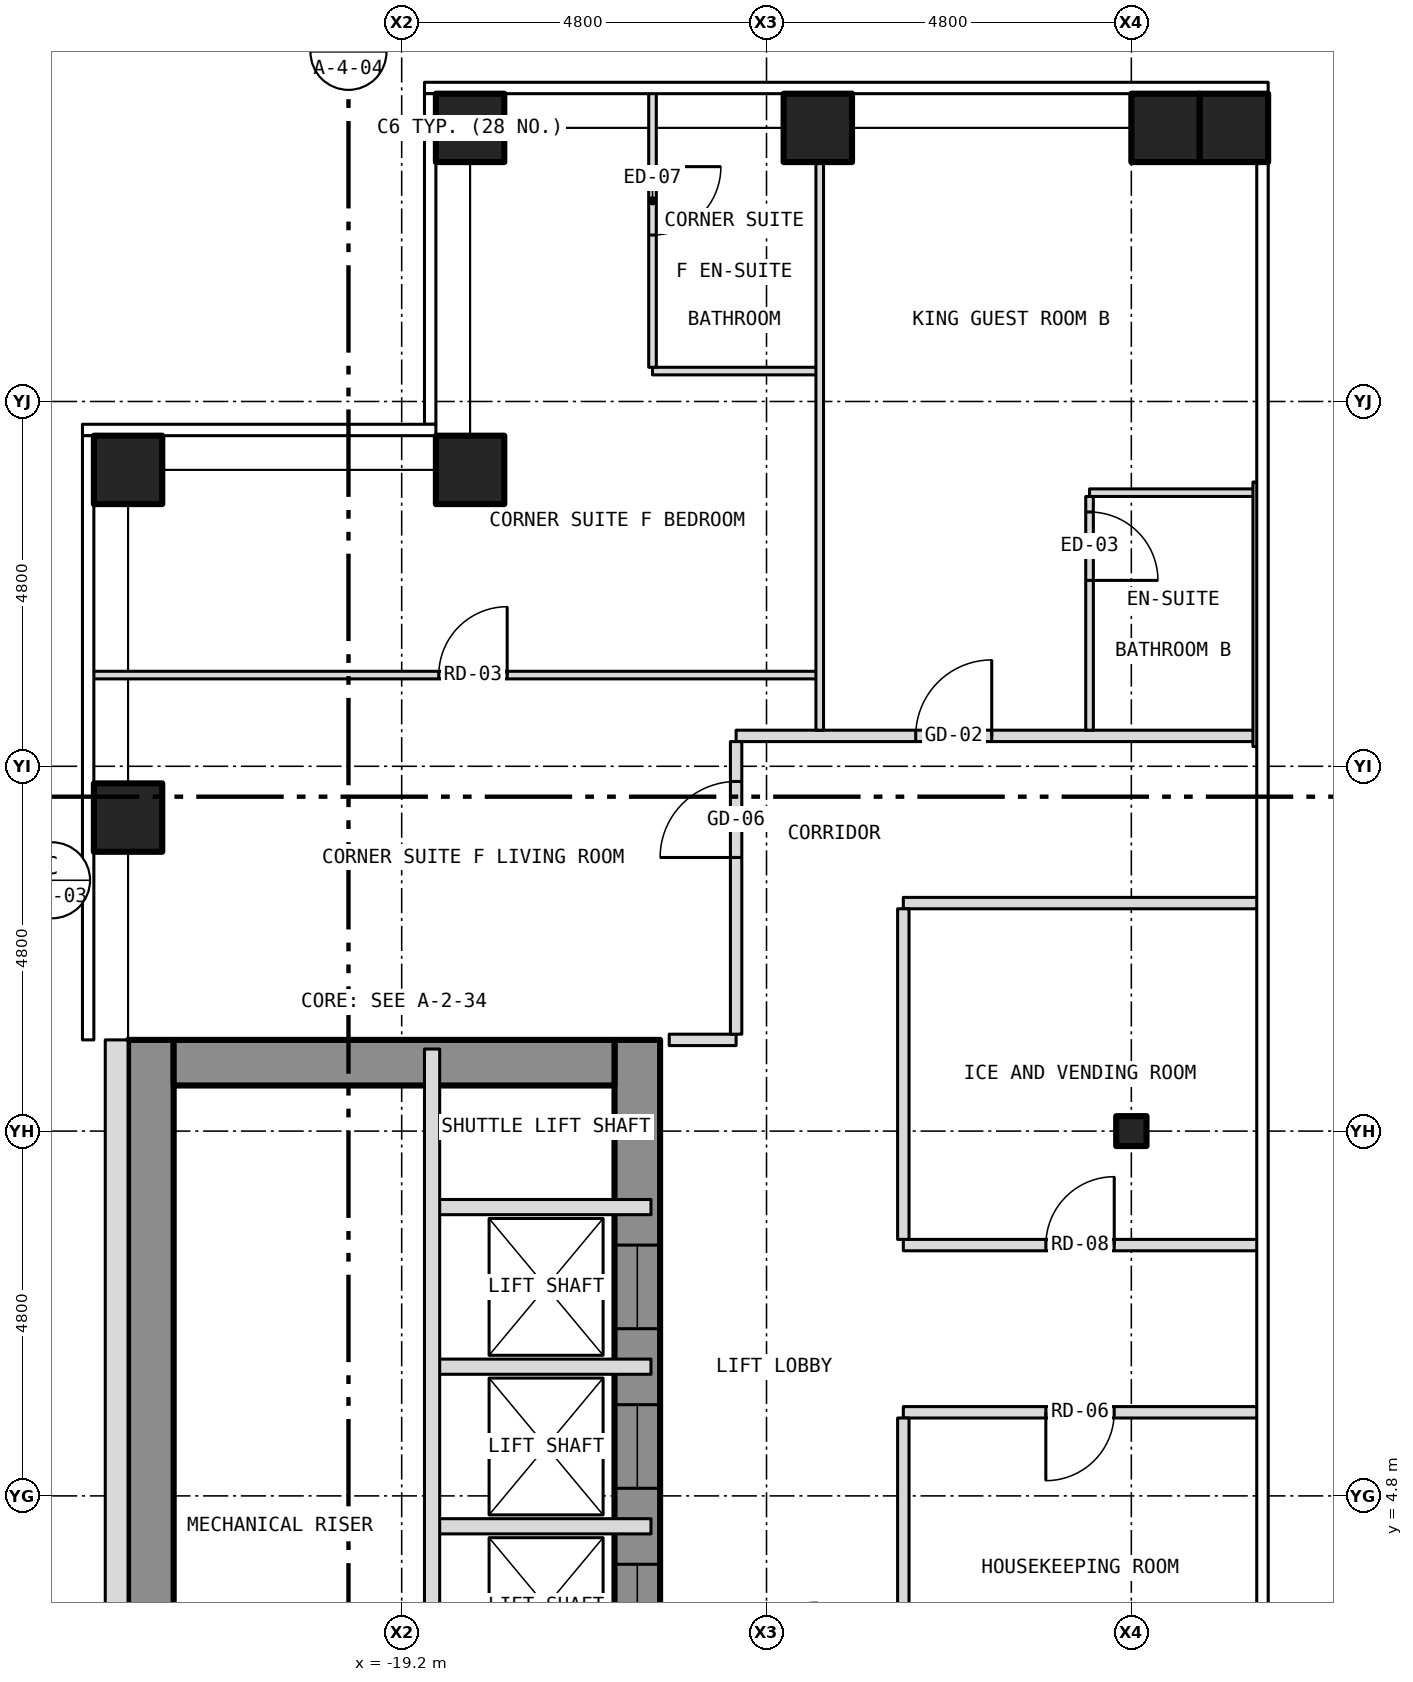
"""IFC4 building model, lengths in metres.
Left out: names, types, materials, properties, quantities, classifications, styles, units other than length and angle.
Written with IfcOpenShell. Run it as: python <this file> out.ifc"""

import sys

from ifc_helpers import new_model, si_unit, direction, frame, frame_2d, origin, origin_2d, place, context, subcontext, project, spatial, rectangle, hollow_rectangle, i_section, extrude, element, fill, save


model = new_model("IFC4")
c1 = context("Model", 3, precision=1e-05, world=origin(), true_north=direction((0.0, 1.0)))
c2 = subcontext(c1, "Body", "Model", "MODEL_VIEW")
j1 = project(units=[si_unit("LENGTHUNIT", "METRE"), si_unit("PLANEANGLEUNIT", "RADIAN")], contexts=[c1])
p1 = place(None, origin())
s1 = spatial("IfcSite", under=j1, at=p1, CompositionType="ELEMENT")
p2 = place(p1, origin())
s2 = spatial("IfcBuilding", under=s1, at=p2, CompositionType="ELEMENT")
p3 = place(p2, frame((0.0, 0.0, 124.0)))
s3 = spatial("IfcBuildingStorey", under=s2, at=p3, CompositionType="ELEMENT", Elevation=124.0)
for number, where, z_axis, x_axis in (
    (1, (-18.3, 22.8, -0.15), (0.0, 0.0, 1.0), (1.0, 0.0, 0.0)),
    (2, (-13.725, 22.8, -0.15), (0.0, 0.0, 1.0), (1.0, 0.0, 0.0)),
    (3, (-9.15, 22.8, -0.15), (0.0, 0.0, 1.0), (1.0, 0.0, 0.0)),
    (4, (-22.8, 13.725, -0.15), (0.0, 0.0, 1.0), (1.0, 0.0, 0.0)),
    (5, (-22.8, 18.3, -0.15), (0.0, 0.0, 1.0), (1.0, 0.0, 0.0)),
    (6, (-18.3, 18.3, -0.15), (0.0, 0.0, 1.0), (1.0, 0.0, 0.0)),
    (7, (-8.25, 22.8, -0.15), (0.0, 0.0, 1.0), (1.0, 0.0, 0.0)),
):
    element("IfcColumn", number, at=place(p3, frame(where, z_axis=z_axis, x_axis=x_axis)), inside=s3, PredefinedType="COLUMN", context=c2, shape_type="SweptSolid", body=[
        extrude(hollow_rectangle(XDim=0.9, YDim=0.9, WallThickness=0.05, at=origin_2d()), origin(), (0.0, 0.0, 1.0), 3.5),
    ])
p4 = place(p3, frame((-9.6, 9.6, -0.15), z_axis=(0.0, 0.0, 1.0), x_axis=(1.0, 0.0, 0.0)))
e8 = element("IfcColumn", 8, at=p4, inside=s3, PredefinedType="COLUMN", context=c2, shape_type="SweptSolid", body=[
    extrude(i_section(OverallWidth=0.399, OverallDepth=0.394, WebThickness=0.023, FlangeThickness=0.037, at=origin_2d()), origin(), (0.0, 0.0, 1.0), 3.5),
])
p5 = place(p3, frame((-16.1, -10.8, 0.0), z_axis=(0.0, 0.0, 1.0), x_axis=(0.0, 1.0, 0.0)))
e9 = element("IfcWall", 9, at=p5, inside=s3, PredefinedType="SHEAR", context=c2, shape_type="SweptSolid", body=[
    extrude(rectangle(XDim=21.6, YDim=0.6, at=frame_2d((10.8, 0.0))), origin(), (0.0, 0.0, 1.0), 3.25),
])
p6 = place(p5, frame((9.4, 0.0, 0.0)))
e10 = element("IfcOpeningElement", 10, at=p6, cuts=e9, PredefinedType="OPENING", context=c2, shape_type="SweptSolid", body=[
    extrude(rectangle(XDim=1.1, YDim=2.1, at=frame_2d((0.55, 1.05))), frame((0.0, 0.312, 0.0), z_axis=(0.0, -1.0, 0.0), x_axis=(1.0, 0.0, 0.0)), (0.0, 0.0, 1.0), 0.624),
])
p7 = place(p5, frame((11.5, 0.0, 0.0)))
e11 = element("IfcOpeningElement", 11, at=p7, cuts=e9, PredefinedType="OPENING", context=c2, shape_type="SweptSolid", body=[
    extrude(rectangle(XDim=1.1, YDim=2.1, at=frame_2d((0.55, 1.05))), frame((0.0, 0.312, 0.0), z_axis=(0.0, -1.0, 0.0), x_axis=(1.0, 0.0, 0.0)), (0.0, 0.0, 1.0), 0.624),
])
p8 = place(p5, frame((13.6, 0.0, 0.0)))
e12 = element("IfcOpeningElement", 12, at=p8, cuts=e9, PredefinedType="OPENING", context=c2, shape_type="SweptSolid", body=[
    extrude(rectangle(XDim=1.1, YDim=2.1, at=frame_2d((0.55, 1.05))), frame((0.0, 0.312, 0.0), z_axis=(0.0, -1.0, 0.0), x_axis=(1.0, 0.0, 0.0)), (0.0, 0.0, 1.0), 0.624),
])
p9 = place(p5, frame((15.7, 0.0, 0.0)))
e13 = element("IfcOpeningElement", 13, at=p9, cuts=e9, PredefinedType="OPENING", context=c2, shape_type="SweptSolid", body=[
    extrude(rectangle(XDim=1.1, YDim=2.1, at=frame_2d((0.55, 1.05))), frame((0.0, 0.312, 0.0), z_axis=(0.0, -1.0, 0.0), x_axis=(1.0, 0.0, 0.0)), (0.0, 0.0, 1.0), 0.624),
])
p10 = place(p5, frame((17.8, 0.0, 0.0)))
e14 = element("IfcOpeningElement", 14, at=p10, cuts=e9, PredefinedType="OPENING", context=c2, shape_type="SweptSolid", body=[
    extrude(rectangle(XDim=1.1, YDim=2.1, at=frame_2d((0.55, 1.05))), frame((0.0, 0.312, 0.0), z_axis=(0.0, -1.0, 0.0), x_axis=(1.0, 0.0, 0.0)), (0.0, 0.0, 1.0), 0.624),
])
p11 = place(p5, frame((0.758, 0.0, 0.0)))
e15 = element("IfcOpeningElement", 15, at=p11, cuts=e9, PredefinedType="OPENING", context=c2, shape_type="SweptSolid", body=[
    extrude(rectangle(XDim=1.1, YDim=2.1, at=frame_2d((0.55, 1.05))), frame((0.0, 0.312, 0.0), z_axis=(0.0, -1.0, 0.0), x_axis=(1.0, 0.0, 0.0)), (0.0, 0.0, 1.0), 0.624),
])
p12 = place(p5, frame((7.5, 0.0, 0.0)))
e16 = element("IfcOpeningElement", 16, at=p12, cuts=e9, PredefinedType="OPENING", context=c2, shape_type="SweptSolid", body=[
    extrude(rectangle(XDim=1.1, YDim=2.1, at=frame_2d((0.55, 1.05))), frame((0.0, 0.312, 0.0), z_axis=(0.0, -1.0, 0.0), x_axis=(1.0, 0.0, 0.0)), (0.0, 0.0, 1.0), 0.624),
])
p13 = place(p3, frame((-22.5, -10.8, 0.0), z_axis=(0.0, 0.0, 1.0), x_axis=(0.0, 1.0, 0.0)))
e17 = element("IfcWall", 17, at=p13, inside=s3, PredefinedType="SHEAR", context=c2, shape_type="SweptSolid", body=[
    extrude(rectangle(XDim=21.6, YDim=0.6, at=frame_2d((10.8, 0.0))), origin(), (0.0, 0.0, 1.0), 3.25),
])
p14 = place(p3, frame((-22.2, 10.5, 0.0), z_axis=(0.0, 0.0, 1.0), x_axis=(1.0, 0.0, 0.0)))
e18 = element("IfcWall", 18, at=p14, inside=s3, PredefinedType="SHEAR", context=c2, shape_type="SweptSolid", body=[
    extrude(rectangle(XDim=5.8, YDim=0.6, at=frame_2d((2.9, 0.0))), origin(), (0.0, 0.0, 1.0), 3.25),
])
p15 = place(p3, frame((-22.95, 10.8, 0.0), z_axis=(0.0, 0.0, 1.0), x_axis=(0.0, -1.0, 0.0)))
e19 = element("IfcWall", 19, at=p15, inside=s3, PredefinedType="SOLIDWALL", context=c2, shape_type="SweptSolid", body=[
    extrude(rectangle(XDim=21.6, YDim=0.3, at=frame_2d((10.8, 0.0))), origin(), (0.0, 0.0, 1.0), 3.5),
])
p16 = place(p15, frame((18.05, 0.0, 1.0)))
e20 = element("IfcOpeningElement", 20, at=p16, cuts=e19, PredefinedType="OPENING", context=c2, shape_type="SweptSolid", body=[
    extrude(rectangle(XDim=0.6, YDim=1.5, at=frame_2d((0.3, 0.75))), frame((0.0, 0.162, 0.0), z_axis=(0.0, -1.0, 0.0), x_axis=(1.0, 0.0, 0.0)), (0.0, 0.0, 1.0), 0.324),
])
p17 = place(p3, frame((-18.8, 4.4, 0.0), z_axis=(0.0, 0.0, 1.0), x_axis=(1.0, 0.0, 0.0)))
e21 = element("IfcWall", 21, at=p17, inside=s3, PredefinedType="PARTITIONING", context=c2, shape_type="SweptSolid", body=[
    extrude(rectangle(XDim=2.88, YDim=0.2, at=frame_2d((1.44, 0.0))), origin(), (0.0, 0.0, 1.0), 3.25),
])
p18 = place(p3, frame((-12.6, 5.9, 0.0), z_axis=(0.0, 0.0, 1.0), x_axis=(1.0, 0.0, 0.0)))
e22 = element("IfcWall", 22, at=p18, inside=s3, PredefinedType="PARTITIONING", context=c2, shape_type="SweptSolid", body=[
    extrude(rectangle(XDim=4.68, YDim=0.15, at=frame_2d((2.34, 0.0))), origin(), (0.0, 0.0, 1.0), 3.35),
])
p19 = place(p18, frame((1.875, 0.0, 0.0)))
e23 = element("IfcOpeningElement", 23, at=p19, cuts=e22, PredefinedType="OPENING", context=c2, shape_type="SweptSolid", body=[
    extrude(rectangle(XDim=0.9, YDim=2.1, at=frame_2d((0.45, 1.05))), frame((0.0, 0.087, 0.0), z_axis=(0.0, -1.0, 0.0), x_axis=(1.0, 0.0, 0.0)), (0.0, 0.0, 1.0), 0.174),
])
p20 = place(p3, frame((-18.8, 6.5, 0.0), z_axis=(0.0, 0.0, 1.0), x_axis=(1.0, 0.0, 0.0)))
e24 = element("IfcWall", 24, at=p20, inside=s3, PredefinedType="PARTITIONING", context=c2, shape_type="SweptSolid", body=[
    extrude(rectangle(XDim=2.88, YDim=0.2, at=frame_2d((1.44, 0.0))), origin(), (0.0, 0.0, 1.0), 3.25),
])
p21 = place(p3, frame((-12.6, 8.1, 0.0), z_axis=(0.0, 0.0, 1.0), x_axis=(1.0, 0.0, 0.0)))
e25 = element("IfcWall", 25, at=p21, inside=s3, PredefinedType="PARTITIONING", context=c2, shape_type="SweptSolid", body=[
    extrude(rectangle(XDim=4.68, YDim=0.15, at=frame_2d((2.34, 0.0))), origin(), (0.0, 0.0, 1.0), 3.35),
])
p22 = place(p21, frame((1.875, 0.0, 0.0)))
e26 = element("IfcOpeningElement", 26, at=p22, cuts=e25, PredefinedType="OPENING", context=c2, shape_type="SweptSolid", body=[
    extrude(rectangle(XDim=0.9, YDim=2.1, at=frame_2d((0.45, 1.05))), frame((0.0, 0.087, 0.0), z_axis=(0.0, -1.0, 0.0), x_axis=(1.0, 0.0, 0.0)), (0.0, 0.0, 1.0), 0.174),
])
p23 = place(p3, frame((-18.8, 8.6, 0.0), z_axis=(0.0, 0.0, 1.0), x_axis=(1.0, 0.0, 0.0)))
e27 = element("IfcWall", 27, at=p23, inside=s3, PredefinedType="PARTITIONING", context=c2, shape_type="SweptSolid", body=[
    extrude(rectangle(XDim=2.88, YDim=0.2, at=frame_2d((1.44, 0.0))), origin(), (0.0, 0.0, 1.0), 3.25),
])
p24 = place(p3, frame((-15.68, 10.8, 0.0), z_axis=(0.0, 0.0, 1.0), x_axis=(1.0, 0.0, 0.0)))
e28 = element("IfcWall", 28, at=p24, inside=s3, PredefinedType="PARTITIONING", context=c2, shape_type="SweptSolid", body=[
    extrude(rectangle(XDim=0.88, YDim=0.15, at=frame_2d((0.44, 0.0))), origin(), (0.0, 0.0, 1.0), 3.35),
])
p25 = place(p3, frame((-12.6, 12.6, 0.0), z_axis=(0.0, 0.0, 1.0), x_axis=(1.0, 0.0, 0.0)))
e29 = element("IfcWall", 29, at=p25, inside=s3, PredefinedType="PARTITIONING", context=c2, shape_type="SweptSolid", body=[
    extrude(rectangle(XDim=4.68, YDim=0.15, at=frame_2d((2.34, 0.0))), origin(), (0.0, 0.0, 1.0), 3.35),
])
p26 = place(p3, frame((-14.8, 14.8, 0.0), z_axis=(0.0, 0.0, 1.0), x_axis=(1.0, 0.0, 0.0)))
e30 = element("IfcWall", 30, at=p26, inside=s3, PredefinedType="PARTITIONING", context=c2, shape_type="SweptSolid", body=[
    extrude(rectangle(XDim=6.85, YDim=0.15, at=frame_2d((3.425, 0.0))), origin(), (0.0, 0.0, 1.0), 3.35),
])
p27 = place(p26, frame((2.363, 0.0, 0.0)))
e31 = element("IfcOpeningElement", 31, at=p27, cuts=e30, PredefinedType="OPENING", context=c2, shape_type="SweptSolid", body=[
    extrude(rectangle(XDim=1.0, YDim=2.1, at=frame_2d((0.5, 1.05))), frame((0.0, 0.087, 0.0), z_axis=(0.0, -1.0, 0.0), x_axis=(1.0, 0.0, 0.0)), (0.0, 0.0, 1.0), 0.174),
])
p28 = place(p3, frame((-23.28, 15.6, 0.0), z_axis=(0.0, 0.0, 1.0), x_axis=(1.0, 0.0, 0.0)))
e32 = element("IfcWall", 32, at=p28, inside=s3, PredefinedType="PARTITIONING", context=c2, shape_type="SweptSolid", body=[
    extrude(rectangle(XDim=9.58, YDim=0.1, at=frame_2d((4.79, 0.0))), origin(), (0.0, 0.0, 1.0), 3.35),
])
p29 = place(p28, frame((4.568, 0.0, 0.0)))
e33 = element("IfcOpeningElement", 33, at=p29, cuts=e32, PredefinedType="OPENING", context=c2, shape_type="SweptSolid", body=[
    extrude(rectangle(XDim=0.9, YDim=2.1, at=frame_2d((0.45, 1.05))), frame((0.0, 0.062, 0.0), z_axis=(0.0, -1.0, 0.0), x_axis=(1.0, 0.0, 0.0)), (0.0, 0.0, 1.0), 0.124),
])
for number, where, z_axis, x_axis in (
    (34, (-10.15, 18.0, 0.0), (0.0, 0.0, 1.0), (1.0, 0.0, 0.0)),
    (35, (-15.9, 19.6, 0.0), (0.0, 0.0, 1.0), (1.0, 0.0, 0.0)),
):
    element("IfcWall", number, at=place(p3, frame(where, z_axis=z_axis, x_axis=x_axis)), inside=s3, PredefinedType="PARTITIONING", context=c2, shape_type="SweptSolid", body=[
        extrude(rectangle(XDim=2.2, YDim=0.1, at=frame_2d((1.1, 0.0))), origin(), (0.0, 0.0, 1.0), 3.35),
    ])
p30 = place(p3, frame((-18.8, -1.8, 0.0), z_axis=(0.0, 0.0, 1.0), x_axis=(0.0, 1.0, 0.0)))
e36 = element("IfcWall", 36, at=p30, inside=s3, PredefinedType="PARTITIONING", context=c2, shape_type="SweptSolid", body=[
    extrude(rectangle(XDim=12.48, YDim=0.2, at=frame_2d((6.24, 0.0))), origin(), (0.0, 0.0, 1.0), 3.25),
])
p31 = place(p3, frame((-15.9, 19.65, 0.0), z_axis=(0.0, 0.0, 1.0), x_axis=(0.0, 1.0, 0.0)))
e37 = element("IfcWall", 37, at=p31, inside=s3, PredefinedType="PARTITIONING", context=c2, shape_type="SweptSolid", body=[
    extrude(rectangle(XDim=3.63, YDim=0.1, at=frame_2d((1.815, 0.0))), origin(), (0.0, 0.0, 1.0), 3.35),
])
p32 = place(p31, frame((1.74, 0.0, 0.0)))
e38 = element("IfcOpeningElement", 38, at=p32, cuts=e37, PredefinedType="OPENING", context=c2, shape_type="SweptSolid", body=[
    extrude(rectangle(XDim=0.9, YDim=2.1, at=frame_2d((0.45, 1.05))), frame((0.0, 0.062, 0.0), z_axis=(0.0, -1.0, 0.0), x_axis=(1.0, 0.0, 0.0)), (0.0, 0.0, 1.0), 0.124),
])
p33 = place(p3, frame((-14.8, 10.875, 0.0), z_axis=(0.0, 0.0, 1.0), x_axis=(0.0, 1.0, 0.0)))
e39 = element("IfcWall", 39, at=p33, inside=s3, PredefinedType="PARTITIONING", context=c2, shape_type="SweptSolid", body=[
    extrude(rectangle(XDim=3.85, YDim=0.15, at=frame_2d((1.925, 0.0))), origin(), (0.0, 0.0, 1.0), 3.35),
])
p34 = place(p33, frame((2.325, 0.0, 0.0)))
e40 = element("IfcOpeningElement", 40, at=p34, cuts=e39, PredefinedType="OPENING", context=c2, shape_type="SweptSolid", body=[
    extrude(rectangle(XDim=1.0, YDim=2.1, at=frame_2d((0.5, 1.05))), frame((0.0, 0.087, 0.0), z_axis=(0.0, -1.0, 0.0), x_axis=(1.0, 0.0, 0.0)), (0.0, 0.0, 1.0), 0.174),
])
p35 = place(p3, frame((-13.7, 14.875, 0.0), z_axis=(0.0, 0.0, 1.0), x_axis=(0.0, 1.0, 0.0)))
e41 = element("IfcWall", 41, at=p35, inside=s3, PredefinedType="PARTITIONING", context=c2, shape_type="SweptSolid", body=[
    extrude(rectangle(XDim=7.805, YDim=0.1, at=frame_2d((3.902, 0.0))), origin(), (0.0, 0.0, 1.0), 3.35),
])
p36 = place(p3, frame((-12.6, 2.4, 0.0), z_axis=(0.0, 0.0, 1.0), x_axis=(0.0, 1.0, 0.0)))
e42 = element("IfcWall", 42, at=p36, inside=s3, PredefinedType="PARTITIONING", context=c2, shape_type="SweptSolid", body=[
    extrude(rectangle(XDim=3.425, YDim=0.15, at=frame_2d((1.712, 0.0))), origin(), (0.0, 0.0, 1.0), 3.35),
])
p37 = place(p3, frame((-12.6, 8.175, 0.0), z_axis=(0.0, 0.0, 1.0), x_axis=(0.0, 1.0, 0.0)))
e43 = element("IfcWall", 43, at=p37, inside=s3, PredefinedType="PARTITIONING", context=c2, shape_type="SweptSolid", body=[
    extrude(rectangle(XDim=4.35, YDim=0.15, at=frame_2d((2.175, 0.0))), origin(), (0.0, 0.0, 1.0), 3.35),
])
p38 = place(p3, frame((-10.15, 14.875, 0.0), z_axis=(0.0, 0.0, 1.0), x_axis=(0.0, 1.0, 0.0)))
e44 = element("IfcWall", 44, at=p38, inside=s3, PredefinedType="PARTITIONING", context=c2, shape_type="SweptSolid", body=[
    extrude(rectangle(XDim=3.075, YDim=0.1, at=frame_2d((1.538, 0.0))), origin(), (0.0, 0.0, 1.0), 3.35),
])
p39 = place(p38, frame((1.971, 0.0, 0.0)))
e45 = element("IfcOpeningElement", 45, at=p39, cuts=e44, PredefinedType="OPENING", context=c2, shape_type="SweptSolid", body=[
    extrude(rectangle(XDim=0.9, YDim=2.1, at=frame_2d((0.45, 1.05))), frame((0.0, 0.062, 0.0), z_axis=(0.0, -1.0, 0.0), x_axis=(1.0, 0.0, 0.0)), (0.0, 0.0, 1.0), 0.124),
])
p40 = place(p3, frame((-7.95, 14.66, 0.0), z_axis=(0.0, 0.0, 1.0), x_axis=(0.0, 1.0, 0.0)))
e46 = element("IfcWall", 46, at=p40, inside=s3, PredefinedType="PARTITIONING", context=c2, shape_type="SweptSolid", body=[
    extrude(rectangle(XDim=3.48, YDim=0.1, at=frame_2d((1.74, 0.0))), origin(), (0.0, 0.0, 1.0), 2.733),
])
p41 = place(p8, origin())
e47 = element("IfcDoor", 47, at=p41, inside=s3, OperationType="SLIDING_TO_LEFT", PredefinedType="DOOR", context=c2, shape_type="SweptSolid", body=[
    extrude(rectangle(XDim=1.1, YDim=2.1, at=frame_2d((0.55, 1.05))), frame((0.0, 0.025, 0.0), z_axis=(0.0, -1.0, 0.0), x_axis=(1.0, 0.0, 0.0)), (0.0, 0.0, 1.0), 0.05),
])
fill(e12, e47)
p42 = place(p9, origin())
e48 = element("IfcDoor", 48, at=p42, inside=s3, OperationType="SLIDING_TO_LEFT", PredefinedType="DOOR", context=c2, shape_type="SweptSolid", body=[
    extrude(rectangle(XDim=1.1, YDim=2.1, at=frame_2d((0.55, 1.05))), frame((0.0, 0.025, 0.0), z_axis=(0.0, -1.0, 0.0), x_axis=(1.0, 0.0, 0.0)), (0.0, 0.0, 1.0), 0.05),
])
fill(e13, e48)
p43 = place(p10, origin())
e49 = element("IfcDoor", 49, at=p43, inside=s3, OperationType="SLIDING_TO_LEFT", PredefinedType="DOOR", context=c2, shape_type="SweptSolid", body=[
    extrude(rectangle(XDim=1.1, YDim=2.1, at=frame_2d((0.55, 1.05))), frame((0.0, 0.025, 0.0), z_axis=(0.0, -1.0, 0.0), x_axis=(1.0, 0.0, 0.0)), (0.0, 0.0, 1.0), 0.05),
])
fill(e14, e49)
p44 = place(p27, origin())
e50 = element("IfcDoor", 50, at=p44, inside=s3, OperationType="SINGLE_SWING_RIGHT", PredefinedType="DOOR", context=c2, shape_type="SweptSolid", body=[
    extrude(rectangle(XDim=1.0, YDim=2.1, at=frame_2d((0.5, 1.05))), frame((0.0, 0.025, 0.0), z_axis=(0.0, -1.0, 0.0), x_axis=(1.0, 0.0, 0.0)), (0.0, 0.0, 1.0), 0.05),
])
fill(e31, e50)
p45 = place(p39, origin())
e51 = element("IfcDoor", 51, at=p45, inside=s3, OperationType="SINGLE_SWING_LEFT", PredefinedType="DOOR", context=c2, shape_type="SweptSolid", body=[
    extrude(rectangle(XDim=0.9, YDim=2.1, at=frame_2d((0.45, 1.05))), frame((0.0, 0.025, 0.0), z_axis=(0.0, -1.0, 0.0), x_axis=(1.0, 0.0, 0.0)), (0.0, 0.0, 1.0), 0.05),
])
fill(e45, e51)
p46 = place(p34, origin())
e52 = element("IfcDoor", 52, at=p46, inside=s3, OperationType="SINGLE_SWING_LEFT", PredefinedType="DOOR", context=c2, shape_type="SweptSolid", body=[
    extrude(rectangle(XDim=1.0, YDim=2.1, at=frame_2d((0.5, 1.05))), frame((0.0, 0.025, 0.0), z_axis=(0.0, -1.0, 0.0), x_axis=(1.0, 0.0, 0.0)), (0.0, 0.0, 1.0), 0.05),
])
fill(e40, e52)
p47 = place(p29, origin())
e53 = element("IfcDoor", 53, at=p47, inside=s3, OperationType="SINGLE_SWING_RIGHT", PredefinedType="DOOR", context=c2, shape_type="SweptSolid", body=[
    extrude(rectangle(XDim=0.9, YDim=2.1, at=frame_2d((0.45, 1.05))), frame((0.0, 0.025, 0.0), z_axis=(0.0, -1.0, 0.0), x_axis=(1.0, 0.0, 0.0)), (0.0, 0.0, 1.0), 0.05),
])
fill(e33, e53)
p48 = place(p32, origin())
e54 = element("IfcDoor", 54, at=p48, inside=s3, OperationType="SINGLE_SWING_RIGHT", PredefinedType="DOOR", context=c2, shape_type="SweptSolid", body=[
    extrude(rectangle(XDim=0.9, YDim=2.1, at=frame_2d((0.45, 1.05))), frame((0.0, 0.025, 0.0), z_axis=(0.0, -1.0, 0.0), x_axis=(1.0, 0.0, 0.0)), (0.0, 0.0, 1.0), 0.05),
])
fill(e38, e54)
p49 = place(p19, origin())
e55 = element("IfcDoor", 55, at=p49, inside=s3, OperationType="SINGLE_SWING_LEFT", PredefinedType="DOOR", context=c2, shape_type="SweptSolid", body=[
    extrude(rectangle(XDim=0.9, YDim=2.1, at=frame_2d((0.45, 1.05))), frame((0.0, 0.025, 0.0), z_axis=(0.0, -1.0, 0.0), x_axis=(1.0, 0.0, 0.0)), (0.0, 0.0, 1.0), 0.05),
])
fill(e23, e55)
p50 = place(p22, origin())
e56 = element("IfcDoor", 56, at=p50, inside=s3, OperationType="SINGLE_SWING_RIGHT", PredefinedType="DOOR", context=c2, shape_type="SweptSolid", body=[
    extrude(rectangle(XDim=0.9, YDim=2.1, at=frame_2d((0.45, 1.05))), frame((0.0, 0.025, 0.0), z_axis=(0.0, -1.0, 0.0), x_axis=(1.0, 0.0, 0.0)), (0.0, 0.0, 1.0), 0.05),
])
fill(e26, e56)
save(model, sys.argv[1])
